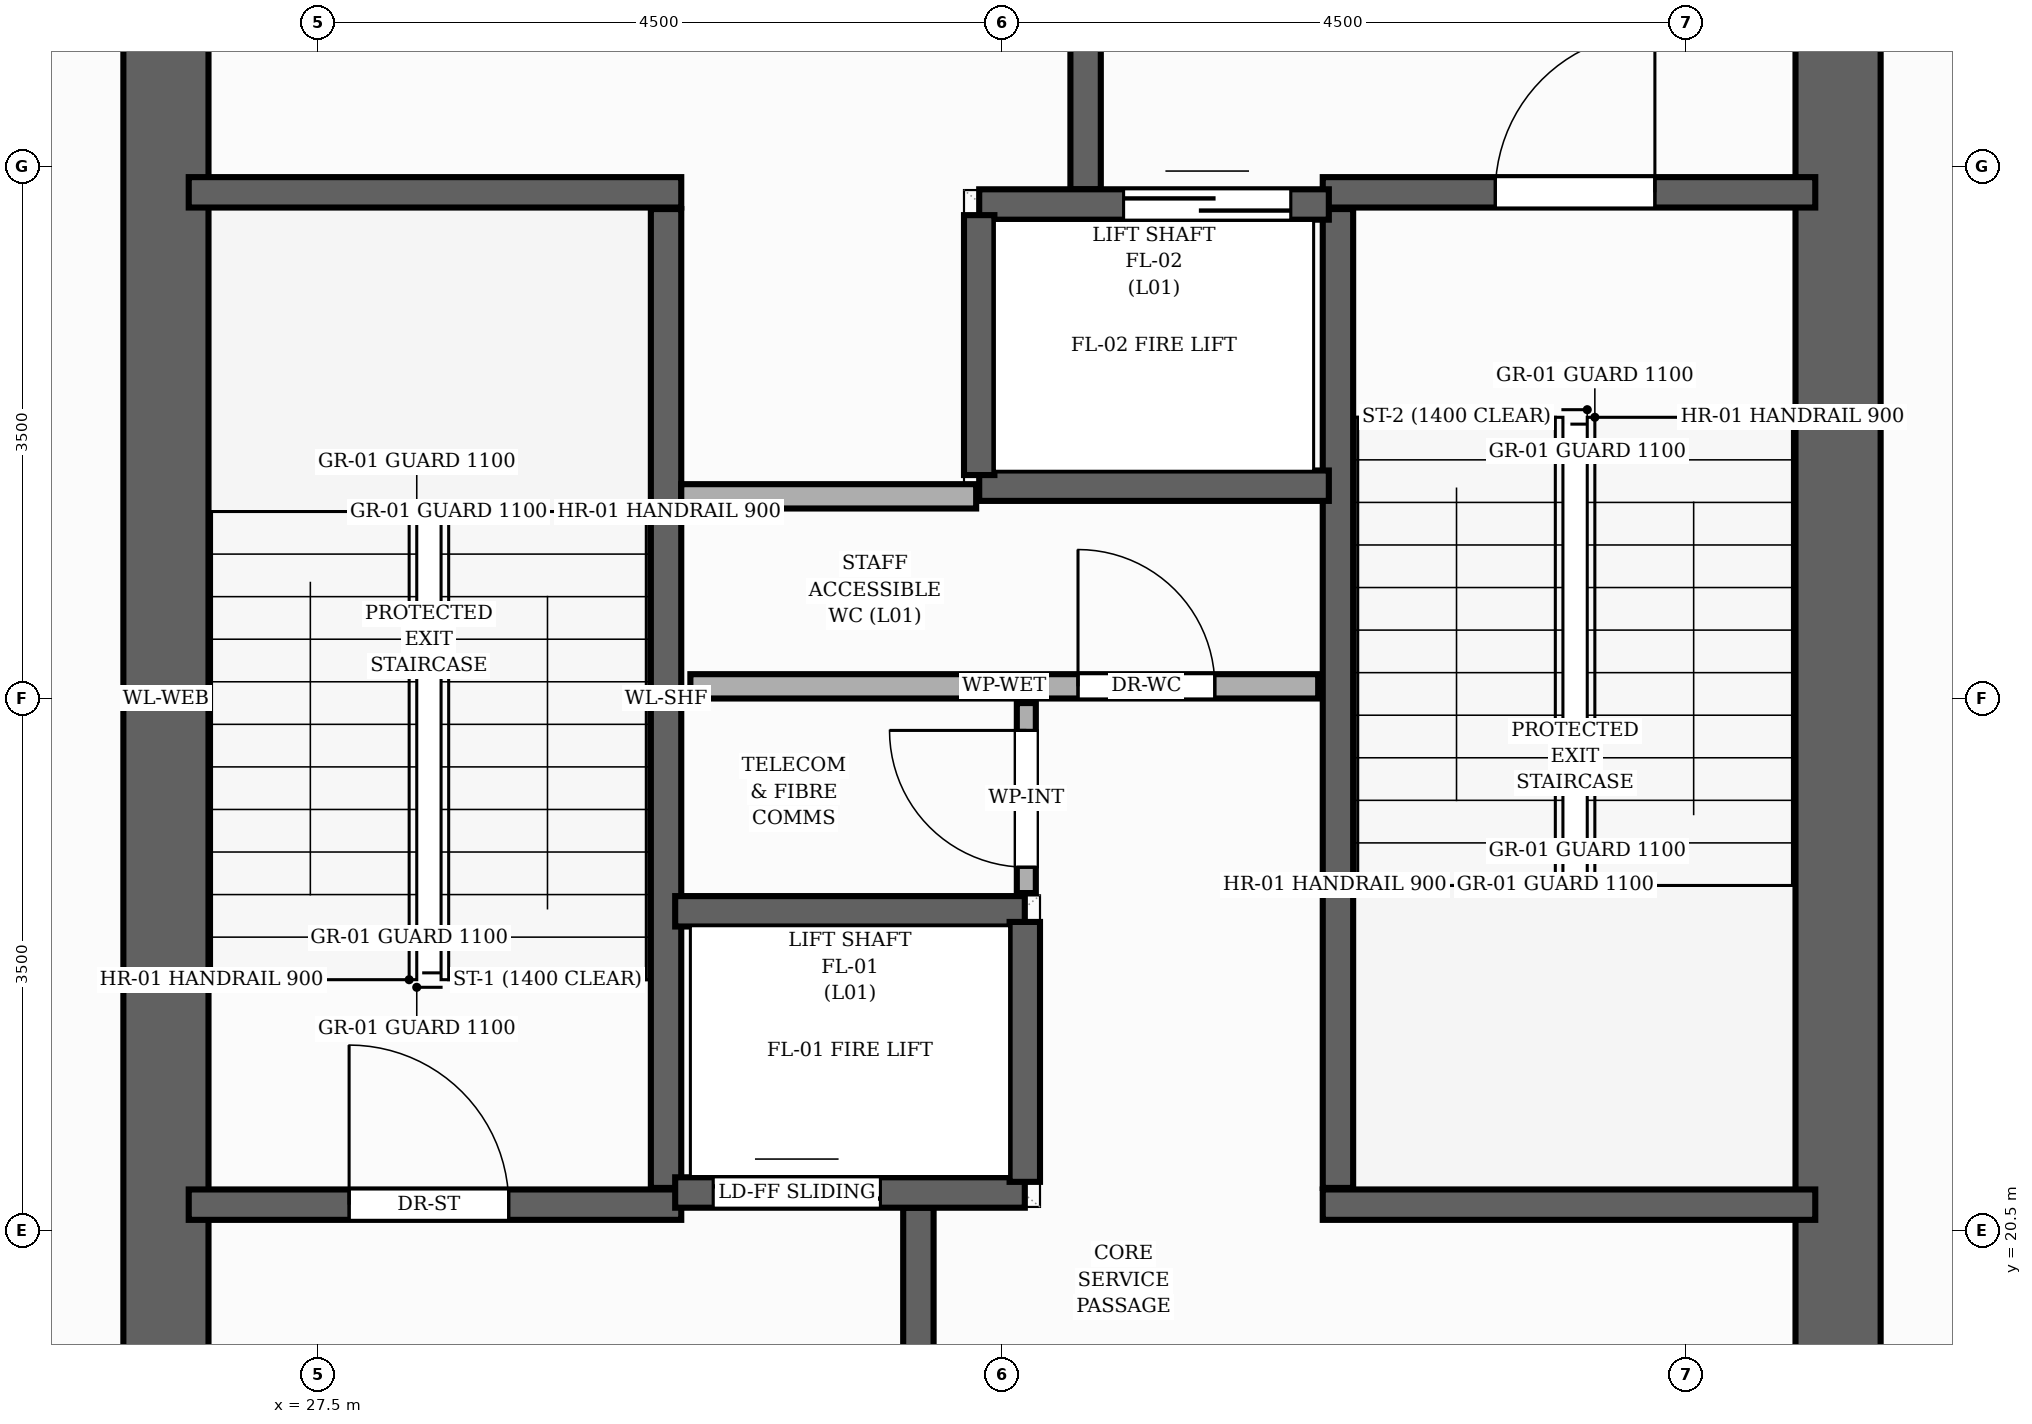
"""IFC4 building model, lengths in metres.
Left out: names, types, materials, properties, quantities, classifications, styles, units other than length and angle.
Written with IfcOpenShell. Run it as: python <this file> out.ifc"""

import sys

from ifc_helpers import new_model, si_unit, direction, frame, frame_2d, origin, place, context, subcontext, project, spatial, rectangle, extrude, element, fill, save


model = new_model("IFC4")
c1 = context("Model", 3, precision=1e-05, world=origin(), true_north=direction((0.0, 1.0)))
c2 = subcontext(c1, "Body", "Model", "MODEL_VIEW")
j1 = project(units=[si_unit("LENGTHUNIT", "METRE"), si_unit("PLANEANGLEUNIT", "RADIAN")], contexts=[c1])
p1 = place(None, origin())
s1 = spatial("IfcSite", under=j1, at=p1, CompositionType="ELEMENT")
p2 = place(p1, origin())
s2 = spatial("IfcBuilding", under=s1, at=p2, CompositionType="ELEMENT")
p3 = place(p2, frame((0.0, 0.0, 4.0)))
s3 = spatial("IfcBuildingStorey", under=s2, at=p3, CompositionType="ELEMENT", Elevation=4.0)
for number, where, z_axis, x_axis in (
    (1, (26.5, 17.4, 0.0), (0.0, 0.0, 1.0), (0.0, 1.0, 0.0)),
    (2, (37.5, 17.4, 0.0), (0.0, 0.0, 1.0), (0.0, 1.0, 0.0)),
):
    element("IfcWall", number, at=place(p3, frame(where, z_axis=z_axis, x_axis=x_axis)), inside=s3, PredefinedType="SHEAR", context=c2, shape_type="SweptSolid", body=[
        extrude(rectangle(XDim=13.2, YDim=0.56, at=frame_2d((6.6, 0.0))), origin(), (0.0, 0.0, 1.0), 4.0),
    ])
p4 = place(p3, frame((29.79, 20.78, 0.0), z_axis=(0.0, 0.0, 1.0), x_axis=(0.0, 1.0, 0.0)))
e3 = element("IfcWall", 3, at=p4, inside=s3, PredefinedType="SHEAR", context=c2, shape_type="SweptSolid", body=[
    extrude(rectangle(XDim=6.44, YDim=0.2, at=frame_2d((3.22, 0.0))), origin(), (0.0, 0.0, 1.0), 4.0),
])
p5 = place(p3, frame((26.65, 27.33, 0.0), z_axis=(0.0, 0.0, 1.0), x_axis=(1.0, 0.0, 0.0)))
e4 = element("IfcWall", 4, at=p5, inside=s3, PredefinedType="SHEAR", context=c2, shape_type="SweptSolid", body=[
    extrude(rectangle(XDim=3.24, YDim=0.2, at=frame_2d((1.62, 0.0))), origin(), (0.0, 0.0, 1.0), 4.0),
])
p6 = place(p3, frame((26.65, 20.67, 0.0), z_axis=(0.0, 0.0, 1.0), x_axis=(1.0, 0.0, 0.0)))
e5 = element("IfcWall", 5, at=p6, inside=s3, PredefinedType="SHEAR", context=c2, shape_type="SweptSolid", body=[
    extrude(rectangle(XDim=3.24, YDim=0.2, at=frame_2d((1.62, 0.0))), origin(), (0.0, 0.0, 1.0), 4.0),
])
p7 = place(p6, frame((1.055, 0.0, 0.0)))
e6 = element("IfcOpeningElement", 6, at=p7, cuts=e5, PredefinedType="OPENING", context=c2, shape_type="SweptSolid", body=[
    extrude(rectangle(XDim=1.05, YDim=2.15, at=frame_2d((0.525, 1.075))), frame((0.0, 0.11, 0.0), z_axis=(0.0, -1.0, 0.0), x_axis=(1.0, 0.0, 0.0)), (0.0, 0.0, 1.0), 0.22),
])
p8 = place(p3, frame((34.21, 20.78, 0.0), z_axis=(0.0, 0.0, 1.0), x_axis=(0.0, 1.0, 0.0)))
e7 = element("IfcWall", 7, at=p8, inside=s3, PredefinedType="SHEAR", context=c2, shape_type="SweptSolid", body=[
    extrude(rectangle(XDim=6.44, YDim=0.2, at=frame_2d((3.22, 0.0))), origin(), (0.0, 0.0, 1.0), 4.0),
])
p9 = place(p3, frame((34.11, 20.67, 0.0), z_axis=(0.0, 0.0, 1.0), x_axis=(1.0, 0.0, 0.0)))
e8 = element("IfcWall", 8, at=p9, inside=s3, PredefinedType="SHEAR", context=c2, shape_type="SweptSolid", body=[
    extrude(rectangle(XDim=3.24, YDim=0.2, at=frame_2d((1.62, 0.0))), origin(), (0.0, 0.0, 1.0), 4.0),
])
p10 = place(p3, frame((34.11, 27.33, 0.0), z_axis=(0.0, 0.0, 1.0), x_axis=(1.0, 0.0, 0.0)))
e9 = element("IfcWall", 9, at=p10, inside=s3, PredefinedType="SHEAR", context=c2, shape_type="SweptSolid", body=[
    extrude(rectangle(XDim=3.24, YDim=0.2, at=frame_2d((1.62, 0.0))), origin(), (0.0, 0.0, 1.0), 4.0),
])
p11 = place(p10, frame((1.135, 0.0, 0.0)))
e10 = element("IfcOpeningElement", 10, at=p11, cuts=e9, PredefinedType="OPENING", context=c2, shape_type="SweptSolid", body=[
    extrude(rectangle(XDim=1.05, YDim=2.15, at=frame_2d((0.525, 1.075))), frame((0.0, 0.11, 0.0), z_axis=(0.0, -1.0, 0.0), x_axis=(1.0, 0.0, 0.0)), (0.0, 0.0, 1.0), 0.22),
])
for number, where, z_axis, x_axis in (
    (11, (31.45, 17.15, 0.0), (0.0, 0.0, 1.0), (0.0, 1.0, 0.0)),
    (12, (32.55, 27.35, 0.0), (0.0, 0.0, 1.0), (0.0, 1.0, 0.0)),
):
    element("IfcWall", number, at=place(p3, frame(where, z_axis=z_axis, x_axis=x_axis)), inside=s3, PredefinedType="SHEAR", context=c2, shape_type="SweptSolid", body=[
        extrude(rectangle(XDim=3.5, YDim=0.2, at=frame_2d((1.75, 0.0))), origin(), (0.0, 0.0, 1.0), 4.0),
    ])
p12 = place(p3, frame((29.85, 20.75, 0.0), z_axis=(0.0, 0.0, 1.0), x_axis=(1.0, 0.0, 0.0)))
e13 = element("IfcWall", 13, at=p12, inside=s3, PredefinedType="SHEAR", context=c2, shape_type="SweptSolid", body=[
    extrude(rectangle(XDim=2.3, YDim=0.2, at=frame_2d((1.15, 0.0))), origin(), (0.0, 0.0, 1.0), 4.0),
])
p13 = place(p12, frame((0.25, 0.0, 0.0)))
e14 = element("IfcOpeningElement", 14, at=p13, cuts=e13, PredefinedType="OPENING", context=c2, shape_type="SweptSolid", body=[
    extrude(rectangle(XDim=1.1, YDim=2.15, at=frame_2d((0.55, 1.075))), frame((0.0, 0.11, 0.0), z_axis=(0.0, -1.0, 0.0), x_axis=(1.0, 0.0, 0.0)), (0.0, 0.0, 1.0), 0.22),
])
p14 = place(p3, frame((29.85, 22.6, 0.0), z_axis=(0.0, 0.0, 1.0), x_axis=(1.0, 0.0, 0.0)))
e15 = element("IfcWall", 15, at=p14, inside=s3, PredefinedType="SHEAR", context=c2, shape_type="SweptSolid", body=[
    extrude(rectangle(XDim=2.3, YDim=0.2, at=frame_2d((1.15, 0.0))), origin(), (0.0, 0.0, 1.0), 4.0),
])
p15 = place(p3, frame((32.15, 20.82, 0.0), z_axis=(0.0, 0.0, 1.0), x_axis=(0.0, 1.0, 0.0)))
e16 = element("IfcWall", 16, at=p15, inside=s3, PredefinedType="SHEAR", context=c2, shape_type="SweptSolid", body=[
    extrude(rectangle(XDim=1.71, YDim=0.2, at=frame_2d((0.855, 0.0))), origin(), (0.0, 0.0, 1.0), 4.0),
])
p16 = place(p3, frame((31.85, 27.25, 0.0), z_axis=(0.0, 0.0, 1.0), x_axis=(1.0, 0.0, 0.0)))
e17 = element("IfcWall", 17, at=p16, inside=s3, PredefinedType="SHEAR", context=c2, shape_type="SweptSolid", body=[
    extrude(rectangle(XDim=2.3, YDim=0.2, at=frame_2d((1.15, 0.0))), origin(), (0.0, 0.0, 1.0), 4.0),
])
p17 = place(p16, frame((0.95, 0.0, 0.0)))
e18 = element("IfcOpeningElement", 18, at=p17, cuts=e17, PredefinedType="OPENING", context=c2, shape_type="SweptSolid", body=[
    extrude(rectangle(XDim=1.1, YDim=2.15, at=frame_2d((0.55, 1.075))), frame((0.0, 0.11, 0.0), z_axis=(0.0, -1.0, 0.0), x_axis=(1.0, 0.0, 0.0)), (0.0, 0.0, 1.0), 0.22),
])
p18 = place(p3, frame((31.85, 25.4, 0.0), z_axis=(0.0, 0.0, 1.0), x_axis=(1.0, 0.0, 0.0)))
e19 = element("IfcWall", 19, at=p18, inside=s3, PredefinedType="SHEAR", context=c2, shape_type="SweptSolid", body=[
    extrude(rectangle(XDim=2.3, YDim=0.2, at=frame_2d((1.15, 0.0))), origin(), (0.0, 0.0, 1.0), 4.0),
])
p19 = place(p3, frame((31.85, 25.47, 0.0), z_axis=(0.0, 0.0, 1.0), x_axis=(0.0, 1.0, 0.0)))
e20 = element("IfcWall", 20, at=p19, inside=s3, PredefinedType="SHEAR", context=c2, shape_type="SweptSolid", body=[
    extrude(rectangle(XDim=1.71, YDim=0.2, at=frame_2d((0.855, 0.0))), origin(), (0.0, 0.0, 1.0), 4.0),
])
p20 = place(p3, frame((29.95, 24.08, 0.0), z_axis=(0.0, 0.0, 1.0), x_axis=(1.0, 0.0, 0.0)))
e21 = element("IfcWall", 21, at=p20, inside=s3, PredefinedType="PLUMBINGWALL", context=c2, shape_type="SweptSolid", body=[
    extrude(rectangle(XDim=4.13, YDim=0.16, at=frame_2d((2.065, 0.0))), origin(), (0.0, 0.0, 1.0), 3.715),
])
p21 = place(p20, frame((2.55, 0.0, 0.0)))
e22 = element("IfcOpeningElement", 22, at=p21, cuts=e21, PredefinedType="OPENING", context=c2, shape_type="SweptSolid", body=[
    extrude(rectangle(XDim=0.9, YDim=2.1, at=frame_2d((0.45, 1.05))), frame((0.0, 0.09, 0.0), z_axis=(0.0, -1.0, 0.0), x_axis=(1.0, 0.0, 0.0)), (0.0, 0.0, 1.0), 0.18),
])
p22 = place(p3, frame((32.16, 22.72, 0.0), z_axis=(0.0, 0.0, 1.0), x_axis=(0.0, 1.0, 0.0)))
e23 = element("IfcWall", 23, at=p22, inside=s3, PredefinedType="PARTITIONING", context=c2, shape_type="SweptSolid", body=[
    extrude(rectangle(XDim=1.25, YDim=0.125, at=frame_2d((0.625, 0.0))), origin(), (0.0, 0.0, 1.0), 3.715),
])
p23 = place(p22, frame((0.17, 0.0, 0.0)))
e24 = element("IfcOpeningElement", 24, at=p23, cuts=e23, PredefinedType="OPENING", context=c2, shape_type="SweptSolid", body=[
    extrude(rectangle(XDim=0.9, YDim=2.1, at=frame_2d((0.45, 1.05))), frame((0.0, 0.073, 0.0), z_axis=(0.0, -1.0, 0.0), x_axis=(1.0, 0.0, 0.0)), (0.0, 0.0, 1.0), 0.145),
])
p24 = place(p3, frame((29.89, 25.33, 0.0), z_axis=(0.0, 0.0, 1.0), x_axis=(1.0, 0.0, 0.0)))
e25 = element("IfcWall", 25, at=p24, inside=s3, PredefinedType="PLUMBINGWALL", context=c2, shape_type="SweptSolid", body=[
    extrude(rectangle(XDim=1.94, YDim=0.16, at=frame_2d((0.97, 0.0))), origin(), (0.0, 0.0, 1.0), 3.715),
])
p25 = place(p7, origin())
e26 = element("IfcDoor", 26, at=p25, inside=s3, OperationType="SINGLE_SWING_LEFT", PredefinedType="DOOR", context=c2, shape_type="SweptSolid", body=[
    extrude(rectangle(XDim=1.05, YDim=2.15, at=frame_2d((0.525, 1.075))), frame((0.0, 0.025, 0.0), z_axis=(0.0, -1.0, 0.0), x_axis=(1.0, 0.0, 0.0)), (0.0, 0.0, 1.0), 0.05),
])
fill(e6, e26)
p26 = place(p11, origin())
e27 = element("IfcDoor", 27, at=p26, inside=s3, OperationType="SINGLE_SWING_RIGHT", PredefinedType="DOOR", context=c2, shape_type="SweptSolid", body=[
    extrude(rectangle(XDim=1.05, YDim=2.15, at=frame_2d((0.525, 1.075))), frame((0.0, 0.025, 0.0), z_axis=(0.0, -1.0, 0.0), x_axis=(1.0, 0.0, 0.0)), (0.0, 0.0, 1.0), 0.05),
])
fill(e10, e27)
p27 = place(p13, origin())
e28 = element("IfcDoor", 28, at=p27, inside=s3, OperationType="DOUBLE_DOOR_SLIDING", PredefinedType="DOOR", context=c2, shape_type="SweptSolid", body=[
    extrude(rectangle(XDim=1.1, YDim=2.15, at=frame_2d((0.55, 1.075))), frame((0.0, 0.025, 0.0), z_axis=(0.0, -1.0, 0.0), x_axis=(1.0, 0.0, 0.0)), (0.0, 0.0, 1.0), 0.05),
])
fill(e14, e28)
p28 = place(p17, origin())
e29 = element("IfcDoor", 29, at=p28, inside=s3, OperationType="DOUBLE_DOOR_SLIDING", PredefinedType="DOOR", context=c2, shape_type="SweptSolid", body=[
    extrude(rectangle(XDim=1.1, YDim=2.15, at=frame_2d((0.55, 1.075))), frame((0.0, 0.025, 0.0), z_axis=(0.0, -1.0, 0.0), x_axis=(1.0, 0.0, 0.0)), (0.0, 0.0, 1.0), 0.05),
])
fill(e18, e29)
p29 = place(p21, origin())
e30 = element("IfcDoor", 30, at=p29, inside=s3, OperationType="SINGLE_SWING_LEFT", PredefinedType="DOOR", context=c2, shape_type="SweptSolid", body=[
    extrude(rectangle(XDim=0.9, YDim=2.1, at=frame_2d((0.45, 1.05))), frame((0.0, 0.025, 0.0), z_axis=(0.0, -1.0, 0.0), x_axis=(1.0, 0.0, 0.0)), (0.0, 0.0, 1.0), 0.05),
])
fill(e22, e30)
p30 = place(p23, origin())
e31 = element("IfcDoor", 31, at=p30, inside=s3, OperationType="SINGLE_SWING_RIGHT", PredefinedType="DOOR", context=c2, shape_type="SweptSolid", body=[
    extrude(rectangle(XDim=0.9, YDim=2.1, at=frame_2d((0.45, 1.05))), frame((0.0, 0.025, 0.0), z_axis=(0.0, -1.0, 0.0), x_axis=(1.0, 0.0, 0.0)), (0.0, 0.0, 1.0), 0.05),
])
fill(e24, e31)
save(model, sys.argv[1])
